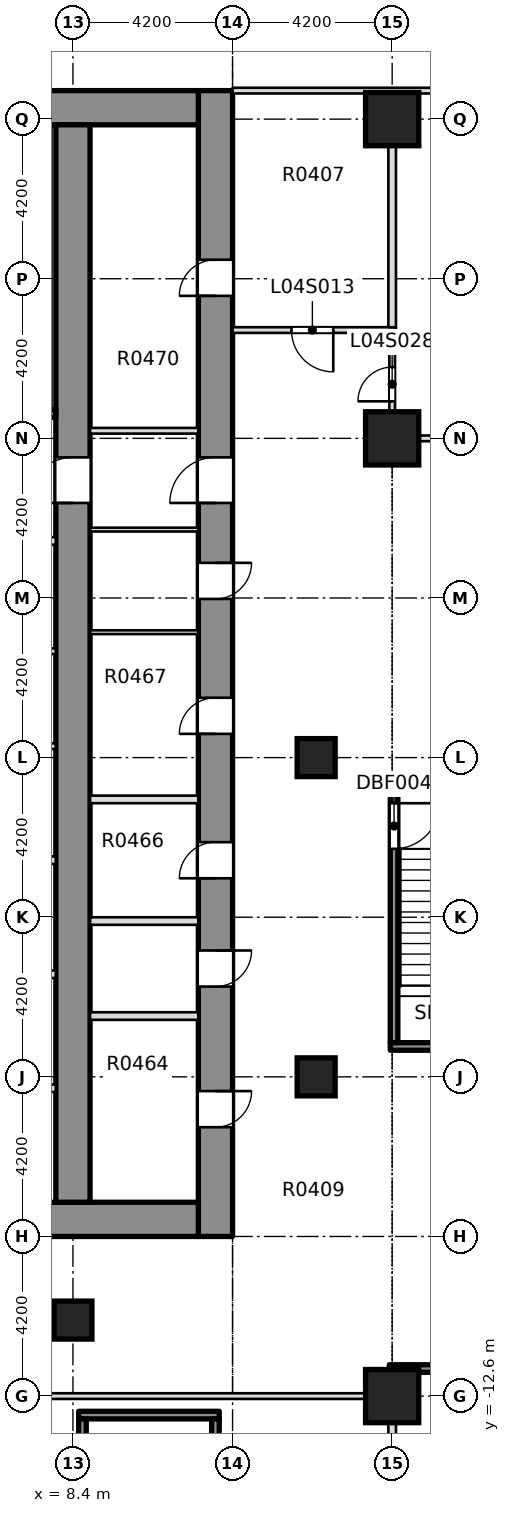
"""IFC4 building model, lengths in metres.
Left out: names, types, materials, properties, quantities, classifications, styles, units other than length and angle.
Written with IfcOpenShell. Run it as: python <this file> out.ifc"""

import sys

from ifc_helpers import new_model, si_unit, direction, frame, frame_2d, origin, origin_2d, place, context, subcontext, project, spatial, rectangle, extrude, element, fill, save


model = new_model("IFC4")
c1 = context("Model", 3, precision=1e-05, world=origin(), true_north=direction((0.0, 1.0)))
c2 = subcontext(c1, "Body", "Model", "MODEL_VIEW")
j1 = project(units=[si_unit("LENGTHUNIT", "METRE"), si_unit("PLANEANGLEUNIT", "RADIAN")], contexts=[c1])
p1 = place(None, origin())
s1 = spatial("IfcSite", under=j1, at=p1, CompositionType="ELEMENT")
p2 = place(p1, origin())
s2 = spatial("IfcBuilding", under=s1, at=p2, CompositionType="ELEMENT")
p3 = place(p2, frame((0.0, 0.0, 25.0)))
s3 = spatial("IfcBuildingStorey", under=s2, at=p3, CompositionType="ELEMENT", Elevation=25.0)
p4 = place(p3, frame((12.15, -8.4, -0.4), z_axis=(0.0, 0.0, 1.0), x_axis=(0.0, 1.0, 0.0)))
e1 = element("IfcWall", 1, at=p4, inside=s3, PredefinedType="SHEAR", context=c2, shape_type="SweptSolid", body=[
    extrude(rectangle(XDim=30.15, YDim=0.9, at=frame_2d((15.075, 0.0))), origin(), (0.0, 0.0, 1.0), 5.0),
])
p5 = place(p4, frame((2.875, 0.0, 0.4)))
e2 = element("IfcOpeningElement", 2, at=p5, cuts=e1, PredefinedType="OPENING", context=c2, shape_type="SweptSolid", body=[
    extrude(rectangle(XDim=0.95, YDim=2.1, at=frame_2d((0.475, 1.05))), frame((0.0, 0.46, 0.0), z_axis=(0.0, -1.0, 0.0), x_axis=(1.0, 0.0, 0.0)), (0.0, 0.0, 1.0), 0.92),
])
p6 = place(p4, frame((6.575, 0.0, 0.4)))
e3 = element("IfcOpeningElement", 3, at=p6, cuts=e1, PredefinedType="OPENING", context=c2, shape_type="SweptSolid", body=[
    extrude(rectangle(XDim=0.95, YDim=2.1, at=frame_2d((0.475, 1.05))), frame((0.0, 0.46, 0.0), z_axis=(0.0, -1.0, 0.0), x_axis=(1.0, 0.0, 0.0)), (0.0, 0.0, 1.0), 0.92),
])
p7 = place(p4, frame((9.425, 0.0, 0.4)))
e4 = element("IfcOpeningElement", 4, at=p7, cuts=e1, PredefinedType="OPENING", context=c2, shape_type="SweptSolid", body=[
    extrude(rectangle(XDim=0.95, YDim=2.1, at=frame_2d((0.475, 1.05))), frame((0.0, 0.46, 0.0), z_axis=(0.0, -1.0, 0.0), x_axis=(1.0, 0.0, 0.0)), (0.0, 0.0, 1.0), 0.92),
])
p8 = place(p4, frame((13.225, 0.0, 0.4)))
e5 = element("IfcOpeningElement", 5, at=p8, cuts=e1, PredefinedType="OPENING", context=c2, shape_type="SweptSolid", body=[
    extrude(rectangle(XDim=0.95, YDim=2.1, at=frame_2d((0.475, 1.05))), frame((0.0, 0.46, 0.0), z_axis=(0.0, -1.0, 0.0), x_axis=(1.0, 0.0, 0.0)), (0.0, 0.0, 1.0), 0.92),
])
p9 = place(p4, frame((16.775, 0.0, 0.4)))
e6 = element("IfcOpeningElement", 6, at=p9, cuts=e1, PredefinedType="OPENING", context=c2, shape_type="SweptSolid", body=[
    extrude(rectangle(XDim=0.95, YDim=2.1, at=frame_2d((0.475, 1.05))), frame((0.0, 0.46, 0.0), z_axis=(0.0, -1.0, 0.0), x_axis=(1.0, 0.0, 0.0)), (0.0, 0.0, 1.0), 0.92),
])
p10 = place(p4, frame((24.75, 0.0, 0.4)))
e7 = element("IfcOpeningElement", 7, at=p10, cuts=e1, PredefinedType="OPENING", context=c2, shape_type="SweptSolid", body=[
    extrude(rectangle(XDim=0.95, YDim=2.1, at=frame_2d((0.475, 1.05))), frame((0.0, 0.46, 0.0), z_axis=(0.0, -1.0, 0.0), x_axis=(1.0, 0.0, 0.0)), (0.0, 0.0, 1.0), 0.92),
])
p11 = place(p4, frame((19.3, 0.0, 0.4)))
e8 = element("IfcOpeningElement", 8, at=p11, cuts=e1, PredefinedType="OPENING", context=c2, shape_type="SweptSolid", body=[
    extrude(rectangle(XDim=1.2, YDim=2.1, at=frame_2d((0.6, 1.05))), frame((0.0, 0.46, 0.0), z_axis=(0.0, -1.0, 0.0), x_axis=(1.0, 0.0, 0.0)), (0.0, 0.0, 1.0), 0.92),
])
p12 = place(p3, frame((-11.7, -7.95, -0.4), z_axis=(0.0, 0.0, 1.0), x_axis=(1.0, 0.0, 0.0)))
e9 = element("IfcWall", 9, at=p12, inside=s3, PredefinedType="SHEAR", context=c2, shape_type="SweptSolid", body=[
    extrude(rectangle(XDim=23.4, YDim=0.9, at=frame_2d((11.7, 0.0))), origin(), (0.0, 0.0, 1.0), 5.0),
])
p13 = place(p12, frame((6.95, 0.0, 0.4)))
e10 = element("IfcOpeningElement", 10, at=p13, cuts=e9, PredefinedType="OPENING", context=c2, shape_type="SweptSolid", body=[
    extrude(rectangle(XDim=1.8, YDim=2.1, at=frame_2d((0.9, 1.05))), frame((0.0, 0.46, 0.0), z_axis=(0.0, -1.0, 0.0), x_axis=(1.0, 0.0, 0.0)), (0.0, 0.0, 1.0), 0.92),
])
p14 = place(p12, frame((14.65, 0.0, 0.4)))
e11 = element("IfcOpeningElement", 11, at=p14, cuts=e9, PredefinedType="OPENING", context=c2, shape_type="SweptSolid", body=[
    extrude(rectangle(XDim=1.8, YDim=2.1, at=frame_2d((0.9, 1.05))), frame((0.0, 0.46, 0.0), z_axis=(0.0, -1.0, 0.0), x_axis=(1.0, 0.0, 0.0)), (0.0, 0.0, 1.0), 0.92),
])
p15 = place(p3, frame((-11.7, 21.3, -0.4), z_axis=(0.0, 0.0, 1.0), x_axis=(1.0, 0.0, 0.0)))
e12 = element("IfcWall", 12, at=p15, inside=s3, PredefinedType="SOLIDWALL", context=c2, shape_type="SweptSolid", body=[
    extrude(rectangle(XDim=23.4, YDim=0.9, at=frame_2d((11.7, 0.0))), origin(), (0.0, 0.0, 1.0), 5.0),
])
p16 = place(p3, frame((8.4, -7.5, -0.4), z_axis=(0.0, 0.0, 1.0), x_axis=(0.0, 1.0, 0.0)))
e13 = element("IfcWall", 13, at=p16, inside=s3, PredefinedType="SHEAR", context=c2, shape_type="SweptSolid", body=[
    extrude(rectangle(XDim=28.35, YDim=0.9, at=frame_2d((14.175, 0.0))), origin(), (0.0, 0.0, 1.0), 5.0),
])
p17 = place(p16, frame((18.4, 0.0, 0.4)))
e14 = element("IfcOpeningElement", 14, at=p17, cuts=e13, PredefinedType="OPENING", context=c2, shape_type="SweptSolid", body=[
    extrude(rectangle(XDim=1.2, YDim=2.1, at=frame_2d((0.6, 1.05))), frame((0.0, 0.46, 0.0), z_axis=(0.0, -1.0, 0.0), x_axis=(1.0, 0.0, 0.0)), (0.0, 0.0, 1.0), 0.92),
])
for number, where, z_axis, x_axis in (
    (15, (16.8, -12.6, -0.4), (0.0, 0.0, 1.0), (1.0, 0.0, 0.0)),
    (16, (16.8, 12.6, -0.4), (0.0, 0.0, 1.0), (1.0, 0.0, 0.0)),
    (17, (16.8, 21.0, -0.4), (0.0, 0.0, 1.0), (1.0, 0.0, 0.0)),
):
    element("IfcColumn", number, at=place(p3, frame(where, z_axis=z_axis, x_axis=x_axis)), inside=s3, PredefinedType="COLUMN", context=c2, shape_type="SweptSolid", body=[
        extrude(rectangle(XDim=1.4, YDim=1.4, at=origin_2d()), origin(), (0.0, 0.0, 1.0), 5.0),
    ])
for number, where, z_axis, x_axis in (
    (18, (8.4, -10.6, -0.4), (0.0, 0.0, 1.0), (1.0, 0.0, 0.0)),
    (19, (14.8, -4.2, -0.4), (0.0, 0.0, 1.0), (1.0, 0.0, 0.0)),
    (20, (14.8, 4.2, -0.4), (0.0, 0.0, 1.0), (1.0, 0.0, 0.0)),
):
    element("IfcColumn", number, at=place(p3, frame(where, z_axis=z_axis, x_axis=x_axis)), inside=s3, PredefinedType="COLUMN", context=c2, shape_type="SweptSolid", body=[
        extrude(rectangle(XDim=1.0, YDim=1.0, at=origin_2d()), origin(), (0.0, 0.0, 1.0), 5.0),
    ])
p18 = place(p3, frame((7.275, -12.6, 0.0), z_axis=(0.0, 0.0, 1.0), x_axis=(1.0, 0.0, 0.0)))
e21 = element("IfcWall", 21, at=p18, inside=s3, PredefinedType="PARTITIONING", context=c2, shape_type="SweptSolid", body=[
    extrude(rectangle(XDim=9.625, YDim=0.15, at=frame_2d((4.812, 0.0))), origin(), (0.0, 0.0, 1.0), 4.6),
])
p19 = place(p3, frame((16.725, -11.875, 0.0), z_axis=(0.0, 0.0, 1.0), x_axis=(1.0, 0.0, 0.0)))
e22 = element("IfcWall", 22, at=p19, inside=s3, PredefinedType="SOLIDWALL", context=c2, shape_type="SweptSolid", body=[
    extrude(rectangle(XDim=8.575, YDim=0.2, at=frame_2d((4.288, 0.0))), origin(), (0.0, 0.0, 1.0), 4.6),
])
p20 = place(p3, frame((16.725, 12.6, 0.0), z_axis=(0.0, 0.0, 1.0), x_axis=(1.0, 0.0, 0.0)))
e23 = element("IfcWall", 23, at=p20, inside=s3, PredefinedType="PARTITIONING", context=c2, shape_type="SweptSolid", body=[
    extrude(rectangle(XDim=8.575, YDim=0.15, at=frame_2d((4.288, 0.0))), origin(), (0.0, 0.0, 1.0), 4.6),
])
p21 = place(p3, frame((12.601, 15.45, 0.0), z_axis=(0.0, 0.0, 1.0), x_axis=(1.0, 0.0, 0.0)))
e24 = element("IfcWall", 24, at=p21, inside=s3, PredefinedType="PARTITIONING", context=c2, shape_type="SweptSolid", body=[
    extrude(rectangle(XDim=4.299, YDim=0.15, at=frame_2d((2.149, 0.0))), origin(), (0.0, 0.0, 1.0), 4.6),
])
p22 = place(p21, frame((1.549, 0.0, 0.0)))
e25 = element("IfcOpeningElement", 25, at=p22, cuts=e24, PredefinedType="OPENING", context=c2, shape_type="SweptSolid", body=[
    extrude(rectangle(XDim=1.1, YDim=2.1, at=frame_2d((0.55, 1.05))), frame((0.0, 0.085, 0.0), z_axis=(0.0, -1.0, 0.0), x_axis=(1.0, 0.0, 0.0)), (0.0, 0.0, 1.0), 0.17),
])
p23 = place(p3, frame((12.601, 21.75, 0.0), z_axis=(0.0, 0.0, 1.0), x_axis=(1.0, 0.0, 0.0)))
e26 = element("IfcWall", 26, at=p23, inside=s3, PredefinedType="PARTITIONING", context=c2, shape_type="SweptSolid", body=[
    extrude(rectangle(XDim=21.074, YDim=0.15, at=frame_2d((10.537, 0.0))), origin(), (0.0, 0.0, 1.0), 4.6),
])
p24 = place(p23, frame((16.349, 0.0, 0.0)))
e27 = element("IfcOpeningElement", 27, at=p24, cuts=e26, PredefinedType="OPENING", context=c2, shape_type="SweptSolid", body=[
    extrude(rectangle(XDim=0.9, YDim=2.1, at=frame_2d((0.45, 1.05))), frame((0.0, 0.085, 0.0), z_axis=(0.0, -1.0, 0.0), x_axis=(1.0, 0.0, 0.0)), (0.0, 0.0, 1.0), 0.17),
])
p25 = place(p3, frame((16.8, -18.125, 0.0), z_axis=(0.0, 0.0, 1.0), x_axis=(0.0, 1.0, 0.0)))
e28 = element("IfcWall", 28, at=p25, inside=s3, PredefinedType="PARTITIONING", context=c2, shape_type="SweptSolid", body=[
    extrude(rectangle(XDim=5.45, YDim=0.2, at=frame_2d((2.725, 0.0))), origin(), (0.0, 0.0, 1.0), 4.6),
])
p26 = place(p3, frame((16.8, -12.525, 0.0), z_axis=(0.0, 0.0, 1.0), x_axis=(0.0, 1.0, 0.0)))
e29 = element("IfcWall", 29, at=p26, inside=s3, PredefinedType="PARTITIONING", context=c2, shape_type="SweptSolid", body=[
    extrude(rectangle(XDim=0.55, YDim=0.15, at=frame_2d((0.275, 0.0))), origin(), (0.0, 0.0, 1.0), 4.6),
])
p27 = place(p3, frame((16.8, 12.675, 0.0), z_axis=(0.0, 0.0, 1.0), x_axis=(0.0, 1.0, 0.0)))
e30 = element("IfcWall", 30, at=p27, inside=s3, PredefinedType="PARTITIONING", context=c2, shape_type="SweptSolid", body=[
    extrude(rectangle(XDim=2.7, YDim=0.15, at=frame_2d((1.35, 0.0))), origin(), (0.0, 0.0, 1.0), 4.6),
])
p28 = place(p27, frame((0.9, 0.0, 0.0)))
e31 = element("IfcOpeningElement", 31, at=p28, cuts=e30, PredefinedType="OPENING", context=c2, shape_type="SweptSolid", body=[
    extrude(rectangle(XDim=0.9, YDim=2.1, at=frame_2d((0.45, 1.05))), frame((0.0, 0.085, 0.0), z_axis=(0.0, -1.0, 0.0), x_axis=(1.0, 0.0, 0.0)), (0.0, 0.0, 1.0), 0.17),
])
p29 = place(p3, frame((16.8, 15.525, 0.0), z_axis=(0.0, 0.0, 1.0), x_axis=(0.0, 1.0, 0.0)))
e32 = element("IfcWall", 32, at=p29, inside=s3, PredefinedType="PARTITIONING", context=c2, shape_type="SweptSolid", body=[
    extrude(rectangle(XDim=6.15, YDim=0.2, at=frame_2d((3.075, 0.0))), origin(), (0.0, 0.0, 1.0), 4.6),
])
for number, where, z_axis, x_axis in (
    (33, (5.575, -4.5, 0.0), (0.0, 0.0, 1.0), (1.0, 0.0, 0.0)),
    (34, (5.575, -1.5, 0.0), (0.0, 0.0, 1.0), (1.0, 0.0, 0.0)),
    (35, (5.575, 1.5, 0.0), (0.0, 0.0, 1.0), (1.0, 0.0, 0.0)),
):
    element("IfcWall", number, at=place(p3, frame(where, z_axis=z_axis, x_axis=x_axis)), inside=s3, PredefinedType="PARTITIONING", context=c2, shape_type="SweptSolid", body=[
        extrude(rectangle(XDim=2.374, YDim=0.2, at=frame_2d((1.187, 0.0))), origin(), (0.0, 0.0, 1.0), 4.6),
    ])
p30 = place(p3, frame((5.425, 4.5, 0.0), z_axis=(0.0, 0.0, 1.0), x_axis=(1.0, 0.0, 0.0)))
e36 = element("IfcWall", 36, at=p30, inside=s3, PredefinedType="PARTITIONING", context=c2, shape_type="SweptSolid", body=[
    extrude(rectangle(XDim=2.524, YDim=0.15, at=frame_2d((1.262, 0.0))), origin(), (0.0, 0.0, 1.0), 4.6),
])
p31 = place(p3, frame((-7.949, 7.0, 0.0), z_axis=(0.0, 0.0, 1.0), x_axis=(1.0, 0.0, 0.0)))
e37 = element("IfcWall", 37, at=p31, inside=s3, PredefinedType="PARTITIONING", context=c2, shape_type="SweptSolid", body=[
    extrude(rectangle(XDim=15.898, YDim=0.15, at=frame_2d((7.949, 0.0))), origin(), (0.0, 0.0, 1.0), 4.6),
])
p32 = place(p31, frame((7.249, 0.0, 0.0)))
e38 = element("IfcOpeningElement", 38, at=p32, cuts=e37, PredefinedType="OPENING", context=c2, shape_type="SweptSolid", body=[
    extrude(rectangle(XDim=1.4, YDim=2.1, at=frame_2d((0.7, 1.05))), frame((0.0, 0.085, 0.0), z_axis=(0.0, -1.0, 0.0), x_axis=(1.0, 0.0, 0.0)), (0.0, 0.0, 1.0), 0.17),
])
p33 = place(p3, frame((3.6, 9.9, 0.0), z_axis=(0.0, 0.0, 1.0), x_axis=(1.0, 0.0, 0.0)))
e39 = element("IfcWall", 39, at=p33, inside=s3, PredefinedType="PARTITIONING", context=c2, shape_type="SweptSolid", body=[
    extrude(rectangle(XDim=4.349, YDim=0.2, at=frame_2d((2.174, 0.0))), origin(), (0.0, 0.0, 1.0), 4.6),
])
p34 = place(p33, frame((2.25, 0.0, 0.0)))
e40 = element("IfcOpeningElement", 40, at=p34, cuts=e39, PredefinedType="OPENING", context=c2, shape_type="SweptSolid", body=[
    extrude(rectangle(XDim=1.1, YDim=2.1, at=frame_2d((0.55, 1.05))), frame((0.0, 0.11, 0.0), z_axis=(0.0, -1.0, 0.0), x_axis=(1.0, 0.0, 0.0)), (0.0, 0.0, 1.0), 0.22),
])
p35 = place(p3, frame((3.425, 13.25, 0.0), z_axis=(0.0, 0.0, 1.0), x_axis=(1.0, 0.0, 0.0)))
e41 = element("IfcWall", 41, at=p35, inside=s3, PredefinedType="SOLIDWALL", context=c2, shape_type="SweptSolid", body=[
    extrude(rectangle(XDim=4.524, YDim=0.2, at=frame_2d((2.262, 0.0))), origin(), (0.0, 0.0, 1.0), 4.6),
])
p36 = place(p35, frame((1.825, 0.0, 0.0)))
e42 = element("IfcOpeningElement", 42, at=p36, cuts=e41, PredefinedType="OPENING", context=c2, shape_type="SweptSolid", body=[
    extrude(rectangle(XDim=1.2, YDim=2.1, at=frame_2d((0.6, 1.05))), frame((0.0, 0.11, 0.0), z_axis=(0.0, -1.0, 0.0), x_axis=(1.0, 0.0, 0.0)), (0.0, 0.0, 1.0), 0.22),
])
for number, where, z_axis, x_axis in (
    (43, (8.851, -2.6, 0.0), (0.0, 0.0, 1.0), (1.0, 0.0, 0.0)),
    (44, (8.851, -0.1, 0.0), (0.0, 0.0, 1.0), (1.0, 0.0, 0.0)),
    (45, (8.851, 3.1, 0.0), (0.0, 0.0, 1.0), (1.0, 0.0, 0.0)),
):
    element("IfcWall", number, at=place(p3, frame(where, z_axis=z_axis, x_axis=x_axis)), inside=s3, PredefinedType="PARTITIONING", context=c2, shape_type="SweptSolid", body=[
        extrude(rectangle(XDim=2.848, YDim=0.2, at=frame_2d((1.424, 0.0))), origin(), (0.0, 0.0, 1.0), 4.6),
    ])
for number, where, z_axis, x_axis in (
    (46, (8.851, 7.5, 0.0), (0.0, 0.0, 1.0), (1.0, 0.0, 0.0)),
    (47, (8.851, 10.2, 0.0), (0.0, 0.0, 1.0), (1.0, 0.0, 0.0)),
):
    element("IfcWall", number, at=place(p3, frame(where, z_axis=z_axis, x_axis=x_axis)), inside=s3, PredefinedType="PARTITIONING", context=c2, shape_type="SweptSolid", body=[
        extrude(rectangle(XDim=2.848, YDim=0.1, at=frame_2d((1.424, 0.0))), origin(), (0.0, 0.0, 1.0), 4.6),
    ])
p37 = place(p3, frame((8.851, 12.8, 0.0), z_axis=(0.0, 0.0, 1.0), x_axis=(1.0, 0.0, 0.0)))
e48 = element("IfcWall", 48, at=p37, inside=s3, PredefinedType="PARTITIONING", context=c2, shape_type="SweptSolid", body=[
    extrude(rectangle(XDim=2.848, YDim=0.15, at=frame_2d((1.424, 0.0))), origin(), (0.0, 0.0, 1.0), 4.6),
])
p38 = place(p3, frame((8.55, -13.1, 0.0), z_axis=(0.0, 0.0, 1.0), x_axis=(1.0, 0.0, 0.0)))
e49 = element("IfcWall", 49, at=p38, inside=s3, PredefinedType="SOLIDWALL", context=c2, shape_type="SweptSolid", body=[
    extrude(rectangle(XDim=3.7, YDim=0.2, at=frame_2d((1.85, 0.0))), origin(), (0.0, 0.0, 1.0), 4.6),
])
p39 = place(p3, frame((8.65, -20.3, 0.0), z_axis=(0.0, 0.0, 1.0), x_axis=(0.0, 1.0, 0.0)))
e50 = element("IfcWall", 50, at=p39, inside=s3, PredefinedType="SOLIDWALL", context=c2, shape_type="SweptSolid", body=[
    extrude(rectangle(XDim=7.1, YDim=0.2, at=frame_2d((3.55, 0.0))), origin(), (0.0, 0.0, 1.0), 4.6),
])
p40 = place(p3, frame((12.15, -19.8, 0.0), z_axis=(0.0, 0.0, 1.0), x_axis=(0.0, 1.0, 0.0)))
e51 = element("IfcWall", 51, at=p40, inside=s3, PredefinedType="SOLIDWALL", context=c2, shape_type="SweptSolid", body=[
    extrude(rectangle(XDim=6.6, YDim=0.2, at=frame_2d((3.3, 0.0))), origin(), (0.0, 0.0, 1.0), 4.6),
])
for number, where, z_axis, x_axis in (
    (52, (16.75, -3.4, 0.0), (0.0, 0.0, 1.0), (1.0, 0.0, 0.0)),
    (53, (16.75, 3.4, 0.0), (0.0, 0.0, 1.0), (1.0, 0.0, 0.0)),
):
    element("IfcWall", number, at=place(p3, frame(where, z_axis=z_axis, x_axis=x_axis)), inside=s3, PredefinedType="SOLIDWALL", context=c2, shape_type="SweptSolid", body=[
        extrude(rectangle(XDim=3.7, YDim=0.2, at=frame_2d((1.85, 0.0))), origin(), (0.0, 0.0, 1.0), 4.6),
    ])
p41 = place(p3, frame((16.85, -3.3, 0.0), z_axis=(0.0, 0.0, 1.0), x_axis=(0.0, 1.0, 0.0)))
e54 = element("IfcWall", 54, at=p41, inside=s3, PredefinedType="SOLIDWALL", context=c2, shape_type="SweptSolid", body=[
    extrude(rectangle(XDim=6.6, YDim=0.2, at=frame_2d((3.3, 0.0))), origin(), (0.0, 0.0, 1.0), 4.6),
])
p42 = place(p41, frame((5.1, 0.0, 0.0)))
e55 = element("IfcOpeningElement", 55, at=p42, cuts=e54, PredefinedType="OPENING", context=c2, shape_type="SweptSolid", body=[
    extrude(rectangle(XDim=1.2, YDim=2.1, at=frame_2d((0.6, 1.05))), frame((0.0, 0.11, 0.0), z_axis=(0.0, -1.0, 0.0), x_axis=(1.0, 0.0, 0.0)), (0.0, 0.0, 1.0), 0.22),
])
p43 = place(p22, origin())
e56 = element("IfcDoor", 56, at=p43, inside=s3, OperationType="SINGLE_SWING_LEFT", PredefinedType="DOOR", context=c2, shape_type="SweptSolid", body=[
    extrude(rectangle(XDim=1.1, YDim=2.1, at=frame_2d((0.55, 1.05))), frame((0.0, 0.025, 0.0), z_axis=(0.0, -1.0, 0.0), x_axis=(1.0, 0.0, 0.0)), (0.0, 0.0, 1.0), 0.05),
])
fill(e25, e56)
p44 = place(p28, origin())
e57 = element("IfcDoor", 57, at=p44, inside=s3, OperationType="SINGLE_SWING_RIGHT", PredefinedType="DOOR", context=c2, shape_type="SweptSolid", body=[
    extrude(rectangle(XDim=0.9, YDim=2.1, at=frame_2d((0.45, 1.05))), frame((0.0, 0.025, 0.0), z_axis=(0.0, -1.0, 0.0), x_axis=(1.0, 0.0, 0.0)), (0.0, 0.0, 1.0), 0.05),
])
fill(e31, e57)
p45 = place(p5, origin())
e58 = element("IfcDoor", 58, at=p45, inside=s3, OperationType="SINGLE_SWING_LEFT", PredefinedType="DOOR", context=c2, shape_type="SweptSolid", body=[
    extrude(rectangle(XDim=0.95, YDim=2.1, at=frame_2d((0.475, 1.05))), frame((0.0, 0.025, 0.0), z_axis=(0.0, -1.0, 0.0), x_axis=(1.0, 0.0, 0.0)), (0.0, 0.0, 1.0), 0.05),
])
fill(e2, e58)
p46 = place(p6, origin())
e59 = element("IfcDoor", 59, at=p46, inside=s3, OperationType="SINGLE_SWING_LEFT", PredefinedType="DOOR", context=c2, shape_type="SweptSolid", body=[
    extrude(rectangle(XDim=0.95, YDim=2.1, at=frame_2d((0.475, 1.05))), frame((0.0, 0.025, 0.0), z_axis=(0.0, -1.0, 0.0), x_axis=(1.0, 0.0, 0.0)), (0.0, 0.0, 1.0), 0.05),
])
fill(e3, e59)
p47 = place(p7, origin())
e60 = element("IfcDoor", 60, at=p47, inside=s3, OperationType="SINGLE_SWING_LEFT", PredefinedType="DOOR", context=c2, shape_type="SweptSolid", body=[
    extrude(rectangle(XDim=0.95, YDim=2.1, at=frame_2d((0.475, 1.05))), frame((0.0, 0.025, 0.0), z_axis=(0.0, -1.0, 0.0), x_axis=(1.0, 0.0, 0.0)), (0.0, 0.0, 1.0), 0.05),
])
fill(e4, e60)
p48 = place(p8, origin())
e61 = element("IfcDoor", 61, at=p48, inside=s3, OperationType="SINGLE_SWING_LEFT", PredefinedType="DOOR", context=c2, shape_type="SweptSolid", body=[
    extrude(rectangle(XDim=0.95, YDim=2.1, at=frame_2d((0.475, 1.05))), frame((0.0, 0.025, 0.0), z_axis=(0.0, -1.0, 0.0), x_axis=(1.0, 0.0, 0.0)), (0.0, 0.0, 1.0), 0.05),
])
fill(e5, e61)
p49 = place(p9, origin())
e62 = element("IfcDoor", 62, at=p49, inside=s3, OperationType="SINGLE_SWING_LEFT", PredefinedType="DOOR", context=c2, shape_type="SweptSolid", body=[
    extrude(rectangle(XDim=0.95, YDim=2.1, at=frame_2d((0.475, 1.05))), frame((0.0, 0.025, 0.0), z_axis=(0.0, -1.0, 0.0), x_axis=(1.0, 0.0, 0.0)), (0.0, 0.0, 1.0), 0.05),
])
fill(e6, e62)
p50 = place(p10, origin())
e63 = element("IfcDoor", 63, at=p50, inside=s3, OperationType="SINGLE_SWING_LEFT", PredefinedType="DOOR", context=c2, shape_type="SweptSolid", body=[
    extrude(rectangle(XDim=0.95, YDim=2.1, at=frame_2d((0.475, 1.05))), frame((0.0, 0.025, 0.0), z_axis=(0.0, -1.0, 0.0), x_axis=(1.0, 0.0, 0.0)), (0.0, 0.0, 1.0), 0.05),
])
fill(e7, e63)
p51 = place(p11, origin())
e64 = element("IfcDoor", 64, at=p51, inside=s3, OperationType="SINGLE_SWING_LEFT", PredefinedType="DOOR", context=c2, shape_type="SweptSolid", body=[
    extrude(rectangle(XDim=1.2, YDim=2.1, at=frame_2d((0.6, 1.05))), frame((0.0, 0.025, 0.0), z_axis=(0.0, -1.0, 0.0), x_axis=(1.0, 0.0, 0.0)), (0.0, 0.0, 1.0), 0.05),
])
fill(e8, e64)
p52 = place(p17, origin())
e65 = element("IfcDoor", 65, at=p52, inside=s3, OperationType="SINGLE_SWING_LEFT", PredefinedType="DOOR", context=c2, shape_type="SweptSolid", body=[
    extrude(rectangle(XDim=1.2, YDim=2.1, at=frame_2d((0.6, 1.05))), frame((0.0, 0.025, 0.0), z_axis=(0.0, -1.0, 0.0), x_axis=(1.0, 0.0, 0.0)), (0.0, 0.0, 1.0), 0.05),
])
fill(e14, e65)
p53 = place(p42, origin())
e66 = element("IfcDoor", 66, at=p53, inside=s3, OperationType="SINGLE_SWING_LEFT", PredefinedType="DOOR", context=c2, shape_type="SweptSolid", body=[
    extrude(rectangle(XDim=1.2, YDim=2.1, at=frame_2d((0.6, 1.05))), frame((0.0, 0.025, 0.0), z_axis=(0.0, -1.0, 0.0), x_axis=(1.0, 0.0, 0.0)), (0.0, 0.0, 1.0), 0.05),
])
fill(e55, e66)
save(model, sys.argv[1])
